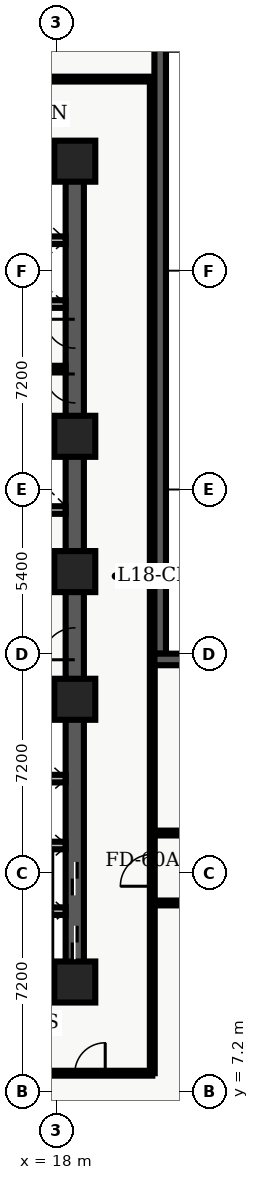
"""IFC4 building model, lengths in metres.
Left out: names, types, materials, properties, quantities, classifications, styles, units other than length and angle.
Written with IfcOpenShell. Run it as: python <this file> out.ifc"""

import sys

from ifc_helpers import new_model, entity, si_unit, converted_unit, direction, frame, origin_with_axes, origin_2d_with_axis, place, context, subcontext, project, spatial, polyline, rectangle, outline, extrude, element, fill, save


model = new_model("IFC4")
c1 = context("Model", 3, precision=1e-05, world=origin_with_axes(), true_north=direction((0.0, 1.0)))
c2 = subcontext(c1, "Body", "Model", "MODEL_VIEW")
j1 = project(units=[si_unit("LENGTHUNIT", "METRE"), converted_unit("PLANEANGLEUNIT", "DEGREE", entity("IfcPlaneAngleMeasure", 0.017), si_unit("PLANEANGLEUNIT", "RADIAN"), dimensions=[0, 0, 0, 0, 0, 0, 0])], contexts=[c1])
p1 = place(None, origin_with_axes())
s1 = spatial("IfcSite", under=j1, at=p1, CompositionType="ELEMENT")
p2 = place(p1, origin_with_axes())
s2 = spatial("IfcBuilding", under=s1, at=p2, CompositionType="ELEMENT")
p3 = place(p2, frame((0.0, 0.0, 75.6), z_axis=(0.0, 0.0, 1.0), x_axis=(1.0, 0.0, 0.0)))
s3 = spatial("IfcBuildingStorey", under=s2, at=p3, CompositionType="ELEMENT", Elevation=75.6)
p4 = place(p3, frame((11.4, 10.8, 0.0), z_axis=(0.0, 0.0, 1.0), x_axis=(1.0, 0.0, 0.0)))
e1 = element("IfcWall", 1, at=p4, inside=s3, PredefinedType="SHEAR", context=c2, shape_type="SweptSolid", body=[
    extrude(outline(polyline([(0.0, -0.3), (7.2, -0.3), (7.2, 0.3), (0.0, 0.3), (0.0, -0.3)])), origin_with_axes(), (0.0, 0.0, 1.0), 3.6),
])
p5 = place(p4, frame((2.625, 0.0, 0.0), z_axis=(0.0, 0.0, 1.0), x_axis=(1.0, 0.0, 0.0)))
e2 = element("IfcOpeningElement", 2, at=p5, cuts=e1, PredefinedType="OPENING", context=c2, shape_type="SweptSolid", body=[
    extrude(rectangle(XDim=1.05, YDim=0.62, at=origin_2d_with_axis()), origin_with_axes(), (0.0, 0.0, 1.0), 2.15),
])
p6 = place(p3, frame((11.4, 37.8, 0.0), z_axis=(0.0, 0.0, 1.0), x_axis=(1.0, 0.0, 0.0)))
e3 = element("IfcWall", 3, at=p6, inside=s3, PredefinedType="SHEAR", context=c2, shape_type="SweptSolid", body=[
    extrude(outline(polyline([(0.0, -0.3), (7.2, -0.3), (7.2, 0.3), (0.0, 0.3), (0.0, -0.3)])), origin_with_axes(), (0.0, 0.0, 1.0), 3.6),
])
p7 = place(p6, frame((2.625, 0.0, 0.0), z_axis=(0.0, 0.0, 1.0), x_axis=(1.0, 0.0, 0.0)))
e4 = element("IfcOpeningElement", 4, at=p7, cuts=e3, PredefinedType="OPENING", context=c2, shape_type="SweptSolid", body=[
    extrude(rectangle(XDim=1.05, YDim=0.62, at=origin_2d_with_axis()), origin_with_axes(), (0.0, 0.0, 1.0), 2.15),
])
p8 = place(p3, frame((18.6, 10.8, 0.0), z_axis=(0.0, 0.0, 1.0), x_axis=(0.0, 1.0, 0.0)))
e5 = element("IfcWall", 5, at=p8, inside=s3, PredefinedType="SHEAR", context=c2, shape_type="SweptSolid", body=[
    extrude(outline(polyline([(0.0, -0.3), (13.5, -0.3), (13.5, 0.3), (0.0, 0.3), (0.0, -0.3)])), origin_with_axes(), (0.0, 0.0, 1.0), 3.6),
])
p9 = place(p8, frame((1.3, 0.0, 0.0), z_axis=(0.0, 0.0, 1.0), x_axis=(1.0, 0.0, 0.0)))
e6 = element("IfcOpeningElement", 6, at=p9, cuts=e5, PredefinedType="OPENING", context=c2, shape_type="SweptSolid", body=[
    extrude(rectangle(XDim=1.1, YDim=0.62, at=origin_2d_with_axis()), origin_with_axes(), (0.0, 0.0, 1.0), 2.15),
])
p10 = place(p8, frame((3.4, 0.0, 0.0), z_axis=(0.0, 0.0, 1.0), x_axis=(1.0, 0.0, 0.0)))
e7 = element("IfcOpeningElement", 7, at=p10, cuts=e5, PredefinedType="OPENING", context=c2, shape_type="SweptSolid", body=[
    extrude(rectangle(XDim=1.1, YDim=0.62, at=origin_2d_with_axis()), origin_with_axes(), (0.0, 0.0, 1.0), 2.15),
])
p11 = place(p8, frame((11.125, 0.0, 0.0), z_axis=(0.0, 0.0, 1.0), x_axis=(1.0, 0.0, 0.0)))
e8 = element("IfcOpeningElement", 8, at=p11, cuts=e5, PredefinedType="OPENING", context=c2, shape_type="SweptSolid", body=[
    extrude(rectangle(XDim=1.05, YDim=0.62, at=origin_2d_with_axis()), origin_with_axes(), (0.0, 0.0, 1.0), 2.15),
])
p12 = place(p3, frame((18.6, 24.3, 0.0), z_axis=(0.0, 0.0, 1.0), x_axis=(0.0, 1.0, 0.0)))
e9 = element("IfcWall", 9, at=p12, inside=s3, PredefinedType="SHEAR", context=c2, shape_type="SweptSolid", body=[
    extrude(outline(polyline([(0.0, -0.3), (13.5, -0.3), (13.5, 0.3), (0.0, 0.3), (0.0, -0.3)])), origin_with_axes(), (0.0, 0.0, 1.0), 3.6),
])
p13 = place(p12, frame((6.025, 0.0, 0.0), z_axis=(0.0, 0.0, 1.0), x_axis=(1.0, 0.0, 0.0)))
e10 = element("IfcOpeningElement", 10, at=p13, cuts=e9, PredefinedType="OPENING", context=c2, shape_type="SweptSolid", body=[
    extrude(rectangle(XDim=0.95, YDim=0.62, at=origin_2d_with_axis()), origin_with_axes(), (0.0, 0.0, 1.0), 2.15),
])
p14 = place(p12, frame((7.825, 0.0, 0.0), z_axis=(0.0, 0.0, 1.0), x_axis=(1.0, 0.0, 0.0)))
e11 = element("IfcOpeningElement", 11, at=p14, cuts=e9, PredefinedType="OPENING", context=c2, shape_type="SweptSolid", body=[
    extrude(rectangle(XDim=0.95, YDim=0.62, at=origin_2d_with_axis()), origin_with_axes(), (0.0, 0.0, 1.0), 2.15),
])
for number, where, z_axis, x_axis in (
    (12, (11.7, 19.825, 0.0), (0.0, 0.0, 1.0), (1.0, 0.0, 0.0)),
    (13, (11.7, 28.775, 0.0), (0.0, 0.0, 1.0), (1.0, 0.0, 0.0)),
):
    element("IfcWall", number, at=place(p3, frame(where, z_axis=z_axis, x_axis=x_axis)), inside=s3, PredefinedType="SHEAR", context=c2, shape_type="SweptSolid", body=[
        extrude(outline(polyline([(0.0, -0.125), (6.6, -0.125), (6.6, 0.125), (0.0, 0.125), (0.0, -0.125)])), origin_with_axes(), (0.0, 0.0, 1.0), 3.6),
    ])
p15 = place(p3, frame((11.7, 24.1, 0.0), z_axis=(0.0, 0.0, 1.0), x_axis=(1.0, 0.0, 0.0)))
e14 = element("IfcWall", 14, at=p15, inside=s3, PredefinedType="SOLIDWALL", context=c2, shape_type="SweptSolid", body=[
    extrude(outline(polyline([(0.0, -0.125), (6.6, -0.125), (6.6, 0.125), (0.0, 0.125), (0.0, -0.125)])), origin_with_axes(), (0.0, 0.0, 1.0), 2.64),
])
p16 = place(p15, frame((3.6, 0.0, 0.0), z_axis=(0.0, 0.0, 1.0), x_axis=(1.0, 0.0, 0.0)))
e15 = element("IfcOpeningElement", 15, at=p16, cuts=e14, PredefinedType="OPENING", context=c2, shape_type="SweptSolid", body=[
    extrude(rectangle(XDim=0.9, YDim=0.27, at=origin_2d_with_axis()), origin_with_axes(), (0.0, 0.0, 1.0), 2.15),
])
p17 = place(p15, frame((5.65, 0.0, 0.0), z_axis=(0.0, 0.0, 1.0), x_axis=(1.0, 0.0, 0.0)))
e16 = element("IfcOpeningElement", 16, at=p17, cuts=e14, PredefinedType="OPENING", context=c2, shape_type="SweptSolid", body=[
    extrude(rectangle(XDim=0.9, YDim=0.27, at=origin_2d_with_axis()), origin_with_axes(), (0.0, 0.0, 1.0), 2.15),
])
p18 = place(p3, frame((11.7, 26.325, 0.0), z_axis=(0.0, 0.0, 1.0), x_axis=(1.0, 0.0, 0.0)))
e17 = element("IfcWall", 17, at=p18, inside=s3, PredefinedType="SOLIDWALL", context=c2, shape_type="SweptSolid", body=[
    extrude(outline(polyline([(0.0, -0.125), (6.6, -0.125), (6.6, 0.125), (0.0, 0.125), (0.0, -0.125)])), origin_with_axes(), (0.0, 0.0, 1.0), 2.64),
])
p19 = place(p18, frame((3.5, 0.0, 0.0), z_axis=(0.0, 0.0, 1.0), x_axis=(1.0, 0.0, 0.0)))
e18 = element("IfcOpeningElement", 18, at=p19, cuts=e17, PredefinedType="OPENING", context=c2, shape_type="SweptSolid", body=[
    extrude(rectangle(XDim=0.9, YDim=0.27, at=origin_2d_with_axis()), origin_with_axes(), (0.0, 0.0, 1.0), 2.15),
])
for number, where, z_axis, x_axis in (
    (19, (18.6, 10.8, 0.0), (0.0, 0.0, 1.0), (1.0, 0.0, 0.0)),
    (20, (18.6, 20.1, 0.0), (0.0, 0.0, 1.0), (1.0, 0.0, 0.0)),
    (21, (18.6, 24.3, 0.0), (0.0, 0.0, 1.0), (1.0, 0.0, 0.0)),
    (22, (18.6, 28.75, 0.0), (0.0, 0.0, 1.0), (1.0, 0.0, 0.0)),
    (23, (18.6, 37.8, 0.0), (0.0, 0.0, 1.0), (1.0, 0.0, 0.0)),
):
    element("IfcColumn", number, at=place(p3, frame(where, z_axis=z_axis, x_axis=x_axis)), inside=s3, PredefinedType="COLUMN", context=c2, shape_type="SweptSolid", body=[
        extrude(rectangle(XDim=1.35, YDim=1.35, at=origin_2d_with_axis()), origin_with_axes(), (0.0, 0.0, 1.0), 3.9),
    ])
for number, where, z_axis, x_axis in (
    (24, (15.84, 13.13, 0.0), (0.0, 0.0, 1.0), (1.0, 0.0, 0.0)),
    (25, (15.84, 15.29, 0.0), (0.0, 0.0, 1.0), (1.0, 0.0, 0.0)),
    (26, (15.84, 17.49, 0.0), (0.0, 0.0, 1.0), (1.0, 0.0, 0.0)),
    (27, (15.84, 33.1, 0.0), (0.0, 0.0, 1.0), (1.0, 0.0, 0.0)),
    (28, (15.84, 35.2, 0.0), (0.0, 0.0, 1.0), (1.0, 0.0, 0.0)),
):
    element("IfcWall", number, at=place(p3, frame(where, z_axis=z_axis, x_axis=x_axis)), inside=s3, PredefinedType="SOLIDWALL", context=c2, shape_type="SweptSolid", body=[
        extrude(outline(polyline([(0.0, -0.125), (2.46, -0.125), (2.46, 0.125), (0.0, 0.125), (0.0, -0.125)])), origin_with_axes(), (0.0, 0.0, 1.0), 2.64),
    ])
p20 = place(p3, frame((15.84, 31.0, 0.0), z_axis=(0.0, 0.0, 1.0), x_axis=(1.0, 0.0, 0.0)))
e29 = element("IfcWall", 29, at=p20, inside=s3, PredefinedType="PARTITIONING", context=c2, shape_type="SweptSolid", body=[
    extrude(outline(polyline([(0.0, -0.07), (2.46, -0.07), (2.46, 0.07), (0.0, 0.07), (0.0, -0.07)])), origin_with_axes(), (0.0, 0.0, 1.0), 2.64),
])
p21 = place(p3, frame((2.6, 7.8, 0.0), z_axis=(0.0, 0.0, 1.0), x_axis=(1.0, 0.0, 0.0)))
e30 = element("IfcWall", 30, at=p21, inside=s3, PredefinedType="PARTITIONING", context=c2, shape_type="SweptSolid", body=[
    extrude(outline(polyline([(0.0, -0.08), (18.55, -0.08), (18.55, 0.08), (0.0, 0.08), (0.0, -0.08)])), origin_with_axes(), (0.0, 0.0, 1.0), 2.64),
])
p22 = place(p21, frame((0.894, 0.0, 0.0), z_axis=(0.0, 0.0, 1.0), x_axis=(1.0, 0.0, 0.0)))
e31 = element("IfcOpeningElement", 31, at=p22, cuts=e30, PredefinedType="OPENING", context=c2, shape_type="SweptSolid", body=[
    extrude(rectangle(XDim=1.0, YDim=0.18, at=origin_2d_with_axis()), origin_with_axes(), (0.0, 0.0, 1.0), 2.15),
])
p23 = place(p21, frame((6.55, 0.0, 0.0), z_axis=(0.0, 0.0, 1.0), x_axis=(1.0, 0.0, 0.0)))
e32 = element("IfcOpeningElement", 32, at=p23, cuts=e30, PredefinedType="OPENING", context=c2, shape_type="SweptSolid", body=[
    extrude(rectangle(XDim=1.0, YDim=0.18, at=origin_2d_with_axis()), origin_with_axes(), (0.0, 0.0, 1.0), 2.15),
])
p24 = place(p21, frame((11.932, 0.0, 0.0), z_axis=(0.0, 0.0, 1.0), x_axis=(1.0, 0.0, 0.0)))
e33 = element("IfcOpeningElement", 33, at=p24, cuts=e30, PredefinedType="OPENING", context=c2, shape_type="SweptSolid", body=[
    extrude(rectangle(XDim=1.0, YDim=0.18, at=origin_2d_with_axis()), origin_with_axes(), (0.0, 0.0, 1.0), 2.15),
])
p25 = place(p21, frame((16.502, 0.0, 0.0), z_axis=(0.0, 0.0, 1.0), x_axis=(1.0, 0.0, 0.0)))
e34 = element("IfcOpeningElement", 34, at=p25, cuts=e30, PredefinedType="OPENING", context=c2, shape_type="SweptSolid", body=[
    extrude(rectangle(XDim=1.0, YDim=0.18, at=origin_2d_with_axis()), origin_with_axes(), (0.0, 0.0, 1.0), 2.15),
])
p26 = place(p3, frame((2.6, 40.5, 0.0), z_axis=(0.0, 0.0, 1.0), x_axis=(1.0, 0.0, 0.0)))
e35 = element("IfcWall", 35, at=p26, inside=s3, PredefinedType="PARTITIONING", context=c2, shape_type="SweptSolid", body=[
    extrude(outline(polyline([(0.0, -0.08), (18.65, -0.08), (18.65, 0.08), (0.0, 0.08), (0.0, -0.08)])), origin_with_axes(), (0.0, 0.0, 1.0), 2.64),
])
p27 = place(p26, frame((0.992, 0.0, 0.0), z_axis=(0.0, 0.0, 1.0), x_axis=(1.0, 0.0, 0.0)))
e36 = element("IfcOpeningElement", 36, at=p27, cuts=e35, PredefinedType="OPENING", context=c2, shape_type="SweptSolid", body=[
    extrude(rectangle(XDim=1.0, YDim=0.18, at=origin_2d_with_axis()), origin_with_axes(), (0.0, 0.0, 1.0), 2.15),
])
p28 = place(p26, frame((7.186, 0.0, 0.0), z_axis=(0.0, 0.0, 1.0), x_axis=(1.0, 0.0, 0.0)))
e37 = element("IfcOpeningElement", 37, at=p28, cuts=e35, PredefinedType="OPENING", context=c2, shape_type="SweptSolid", body=[
    extrude(rectangle(XDim=1.0, YDim=0.18, at=origin_2d_with_axis()), origin_with_axes(), (0.0, 0.0, 1.0), 2.15),
])
p29 = place(p26, frame((13.148, 0.0, 0.0), z_axis=(0.0, 0.0, 1.0), x_axis=(1.0, 0.0, 0.0)))
e38 = element("IfcOpeningElement", 38, at=p29, cuts=e35, PredefinedType="OPENING", context=c2, shape_type="SweptSolid", body=[
    extrude(rectangle(XDim=1.0, YDim=0.18, at=origin_2d_with_axis()), origin_with_axes(), (0.0, 0.0, 1.0), 2.15),
])
p30 = place(p3, frame((21.15, 7.8, 0.0), z_axis=(0.0, 0.0, 1.0), x_axis=(0.0, 1.0, 0.0)))
e39 = element("IfcWall", 39, at=p30, inside=s3, PredefinedType="PARTITIONING", context=c2, shape_type="SweptSolid", body=[
    extrude(outline(polyline([(0.0, -0.08), (32.7, -0.08), (32.7, 0.08), (0.0, 0.08), (0.0, -0.08)])), origin_with_axes(), (0.0, 0.0, 1.0), 2.64),
])
p31 = place(p30, frame((6.675, 0.0, 0.0), z_axis=(0.0, 0.0, 1.0), x_axis=(1.0, 0.0, 0.0)))
e40 = element("IfcOpeningElement", 40, at=p31, cuts=e39, PredefinedType="OPENING", context=c2, shape_type="SweptSolid", body=[
    extrude(rectangle(XDim=1.05, YDim=0.18, at=origin_2d_with_axis()), origin_with_axes(), (0.0, 0.0, 1.0), 2.15),
])
p32 = place(p3, frame((21.15, 13.4, 0.0), z_axis=(0.0, 0.0, 1.0), x_axis=(1.0, 0.0, 0.0)))
e41 = element("IfcWall", 41, at=p32, inside=s3, PredefinedType="PARTITIONING", context=c2, shape_type="SweptSolid", body=[
    extrude(outline(polyline([(0.0, -0.08), (15.2, -0.08), (15.2, 0.08), (0.0, 0.08), (0.0, -0.08)])), origin_with_axes(), (0.0, 0.0, 1.0), 2.64),
])
p33 = place(p32, frame((7.65, 0.0, 0.0), z_axis=(0.0, 0.0, 1.0), x_axis=(1.0, 0.0, 0.0)))
e42 = element("IfcOpeningElement", 42, at=p33, cuts=e41, PredefinedType="OPENING", context=c2, shape_type="SweptSolid", body=[
    extrude(rectangle(XDim=1.0, YDim=0.18, at=origin_2d_with_axis()), origin_with_axes(), (0.0, 0.0, 1.0), 2.15),
])
p34 = place(p3, frame((21.15, 15.7, 0.0), z_axis=(0.0, 0.0, 1.0), x_axis=(1.0, 0.0, 0.0)))
e43 = element("IfcWall", 43, at=p34, inside=s3, PredefinedType="PARTITIONING", context=c2, shape_type="SweptSolid", body=[
    extrude(outline(polyline([(0.0, -0.08), (15.2, -0.08), (15.2, 0.08), (0.0, 0.08), (0.0, -0.08)])), origin_with_axes(), (0.0, 0.0, 1.0), 2.64),
])
p35 = place(p34, frame((2.562, 0.0, 0.0), z_axis=(0.0, 0.0, 1.0), x_axis=(1.0, 0.0, 0.0)))
e44 = element("IfcOpeningElement", 44, at=p35, cuts=e43, PredefinedType="OPENING", context=c2, shape_type="SweptSolid", body=[
    extrude(rectangle(XDim=1.0, YDim=0.18, at=origin_2d_with_axis()), origin_with_axes(), (0.0, 0.0, 1.0), 2.15),
])
p36 = place(p34, frame((6.462, 0.0, 0.0), z_axis=(0.0, 0.0, 1.0), x_axis=(1.0, 0.0, 0.0)))
e45 = element("IfcOpeningElement", 45, at=p36, cuts=e43, PredefinedType="OPENING", context=c2, shape_type="SweptSolid", body=[
    extrude(rectangle(XDim=1.0, YDim=0.18, at=origin_2d_with_axis()), origin_with_axes(), (0.0, 0.0, 1.0), 2.15),
])
p37 = place(p34, frame((9.634, 0.0, 0.0), z_axis=(0.0, 0.0, 1.0), x_axis=(1.0, 0.0, 0.0)))
e46 = element("IfcOpeningElement", 46, at=p37, cuts=e43, PredefinedType="OPENING", context=c2, shape_type="SweptSolid", body=[
    extrude(rectangle(XDim=1.0, YDim=0.18, at=origin_2d_with_axis()), origin_with_axes(), (0.0, 0.0, 1.0), 2.15),
])
p38 = place(p34, frame((13.205, 0.0, 0.0), z_axis=(0.0, 0.0, 1.0), x_axis=(1.0, 0.0, 0.0)))
e47 = element("IfcOpeningElement", 47, at=p38, cuts=e43, PredefinedType="OPENING", context=c2, shape_type="SweptSolid", body=[
    extrude(rectangle(XDim=1.0, YDim=0.18, at=origin_2d_with_axis()), origin_with_axes(), (0.0, 0.0, 1.0), 2.15),
])
p39 = place(p3, frame((21.41, 45.82, 0.0), z_axis=(0.0, 0.0, 1.0), x_axis=(0.0, -1.0, 0.0)))
e48 = element("IfcWall", 48, at=p39, inside=s3, PredefinedType="SOLIDWALL", context=c2, shape_type="SweptSolid", body=[
    extrude(outline(polyline([(0.0, -0.19), (24.22, -0.19), (24.22, 0.19), (0.0, 0.19), (0.0, -0.19)])), origin_with_axes(), (0.0, 0.0, 1.0), 3.6),
])
p40 = place(p39, frame((2.902, 0.0, 0.45), z_axis=(0.0, 0.0, 1.0), x_axis=(1.0, 0.0, 0.0)))
e49 = element("IfcOpeningElement", 49, at=p40, cuts=e48, PredefinedType="OPENING", context=c2, shape_type="SweptSolid", body=[
    extrude(rectangle(XDim=2.1, YDim=0.4, at=origin_2d_with_axis()), origin_with_axes(), (0.0, 0.0, 1.0), 2.2),
])
p41 = place(p3, frame((21.22, 21.41, 0.0), z_axis=(0.0, 0.0, 1.0), x_axis=(1.0, 0.0, 0.0)))
e50 = element("IfcWall", 50, at=p41, inside=s3, PredefinedType="SOLIDWALL", context=c2, shape_type="SweptSolid", body=[
    extrude(outline(polyline([(0.0, -0.19), (17.18, -0.19), (17.18, 0.19), (0.0, 0.19), (0.0, -0.19)])), origin_with_axes(), (0.0, 0.0, 1.0), 3.6),
])
p42 = place(p41, frame((3.263, 0.0, 0.45), z_axis=(0.0, 0.0, 1.0), x_axis=(1.0, 0.0, 0.0)))
e51 = element("IfcOpeningElement", 51, at=p42, cuts=e50, PredefinedType="OPENING", context=c2, shape_type="SweptSolid", body=[
    extrude(rectangle(XDim=2.1, YDim=0.4, at=origin_2d_with_axis()), origin_with_axes(), (0.0, 0.0, 1.0), 2.2),
])
p43 = place(p41, frame((13.467, 0.0, 0.45), z_axis=(0.0, 0.0, 1.0), x_axis=(1.0, 0.0, 0.0)))
e52 = element("IfcOpeningElement", 52, at=p43, cuts=e50, PredefinedType="OPENING", context=c2, shape_type="SweptSolid", body=[
    extrude(rectangle(XDim=2.1, YDim=0.4, at=origin_2d_with_axis()), origin_with_axes(), (0.0, 0.0, 1.0), 2.2),
])
p44 = place(p8, frame((1.3, 0.0, 0.0), z_axis=(0.0, 0.0, 1.0), x_axis=(1.0, 0.0, 0.0)))
e53 = element("IfcDoor", 53, at=p44, inside=s3, OperationType="SLIDING_TO_LEFT", PredefinedType="DOOR", context=c2, shape_type="SweptSolid", body=[
    extrude(rectangle(XDim=1.1, YDim=0.09, at=origin_2d_with_axis()), origin_with_axes(), (0.0, 0.0, 1.0), 2.15),
])
fill(e6, e53)
p45 = place(p8, frame((3.4, 0.0, 0.0), z_axis=(0.0, 0.0, 1.0), x_axis=(1.0, 0.0, 0.0)))
e54 = element("IfcDoor", 54, at=p45, inside=s3, OperationType="SLIDING_TO_RIGHT", PredefinedType="DOOR", context=c2, shape_type="SweptSolid", body=[
    extrude(rectangle(XDim=1.1, YDim=0.09, at=origin_2d_with_axis()), origin_with_axes(), (0.0, 0.0, 1.0), 2.15),
])
fill(e7, e54)
p46 = place(p8, frame((11.125, 0.0, 0.0), z_axis=(0.0, 0.0, 1.0), x_axis=(1.0, 0.0, 0.0)))
e55 = element("IfcDoor", 55, at=p46, inside=s3, OperationType="SINGLE_SWING_LEFT", PredefinedType="DOOR", context=c2, shape_type="SweptSolid", body=[
    extrude(rectangle(XDim=1.05, YDim=0.09, at=origin_2d_with_axis()), origin_with_axes(), (0.0, 0.0, 1.0), 2.15),
])
fill(e8, e55)
p47 = place(p12, frame((6.025, 0.0, 0.0), z_axis=(0.0, 0.0, 1.0), x_axis=(1.0, 0.0, 0.0)))
e56 = element("IfcDoor", 56, at=p47, inside=s3, OperationType="SINGLE_SWING_RIGHT", PredefinedType="DOOR", context=c2, shape_type="SweptSolid", body=[
    extrude(rectangle(XDim=0.95, YDim=0.09, at=origin_2d_with_axis()), origin_with_axes(), (0.0, 0.0, 1.0), 2.15),
])
fill(e10, e56)
p48 = place(p12, frame((7.825, 0.0, 0.0), z_axis=(0.0, 0.0, 1.0), x_axis=(1.0, 0.0, 0.0)))
e57 = element("IfcDoor", 57, at=p48, inside=s3, OperationType="SINGLE_SWING_RIGHT", PredefinedType="DOOR", context=c2, shape_type="SweptSolid", body=[
    extrude(rectangle(XDim=0.95, YDim=0.09, at=origin_2d_with_axis()), origin_with_axes(), (0.0, 0.0, 1.0), 2.15),
])
fill(e11, e57)
p49 = place(p21, frame((16.502, 0.0, 0.0), z_axis=(0.0, 0.0, 1.0), x_axis=(1.0, 0.0, 0.0)))
e58 = element("IfcDoor", 58, at=p49, inside=s3, OperationType="SINGLE_SWING_RIGHT", PredefinedType="DOOR", context=c2, shape_type="SweptSolid", body=[
    extrude(rectangle(XDim=1.0, YDim=0.09, at=origin_2d_with_axis()), origin_with_axes(), (0.0, 0.0, 1.0), 2.15),
])
fill(e34, e58)
p50 = place(p30, frame((6.675, 0.0, 0.0), z_axis=(0.0, 0.0, 1.0), x_axis=(1.0, 0.0, 0.0)))
e59 = element("IfcDoor", 59, at=p50, inside=s3, OperationType="SINGLE_SWING_LEFT", PredefinedType="DOOR", context=c2, shape_type="SweptSolid", body=[
    extrude(rectangle(XDim=1.05, YDim=0.09, at=origin_2d_with_axis()), origin_with_axes(), (0.0, 0.0, 1.0), 2.15),
])
fill(e40, e59)
save(model, sys.argv[1])
